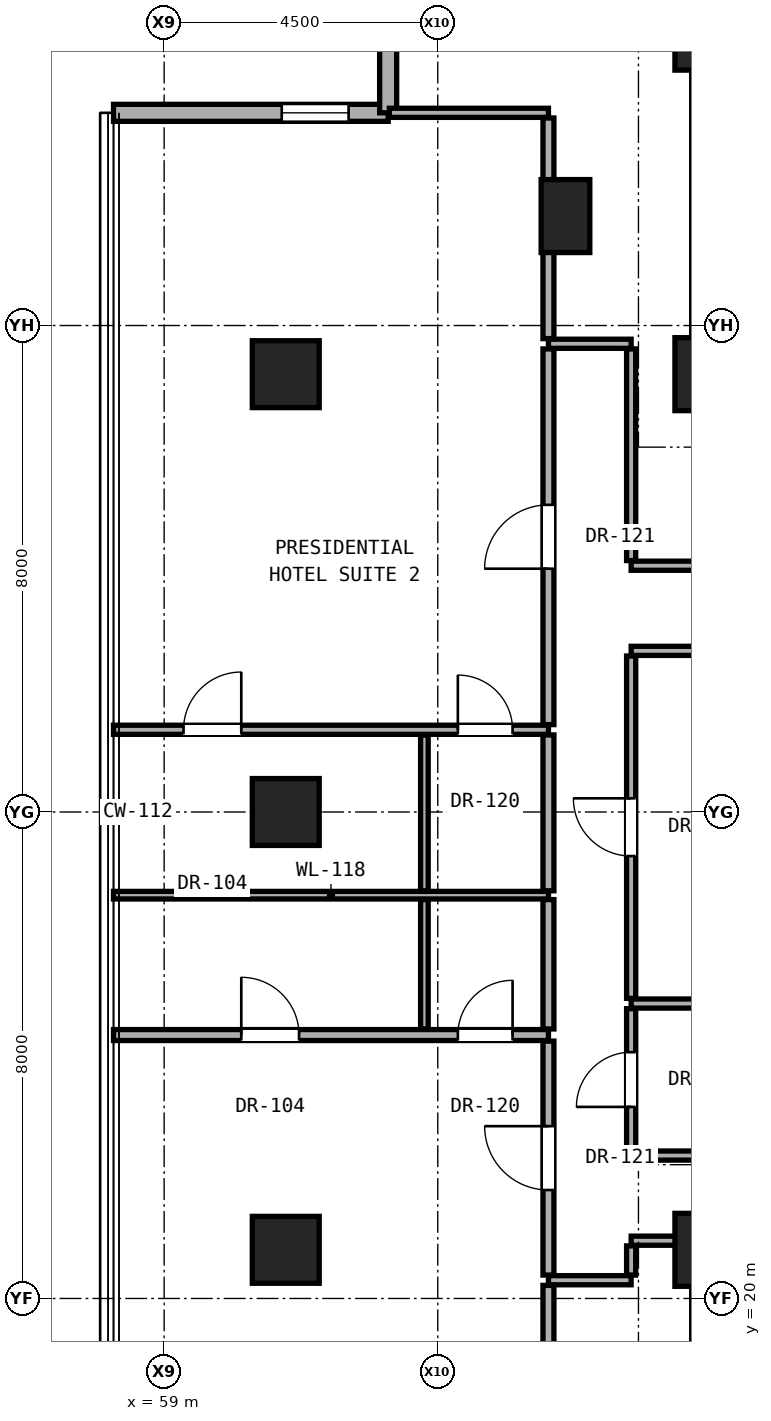
"""IFC4 building model, lengths in metres.
Left out: names, types, materials, properties, quantities, classifications, styles, units other than length and angle.
Written with IfcOpenShell. Run it as: python <this file> out.ifc"""

import sys

from ifc_helpers import new_model, si_unit, direction, frame, frame_2d, origin, origin_2d, place, context, subcontext, project, spatial, rectangle, hollow_rectangle, extrude, element, fill, save


model = new_model("IFC4")
c1 = context("Model", 3, precision=1e-05, world=origin(), true_north=direction((0.0, 1.0)))
c2 = subcontext(c1, "Body", "Model", "MODEL_VIEW")
j1 = project(units=[si_unit("LENGTHUNIT", "METRE"), si_unit("PLANEANGLEUNIT", "RADIAN")], contexts=[c1])
p1 = place(None, origin())
s1 = spatial("IfcSite", under=j1, at=p1, CompositionType="ELEMENT")
p2 = place(p1, origin())
s2 = spatial("IfcBuilding", under=s1, at=p2, CompositionType="ELEMENT")
p3 = place(p2, frame((0.0, 0.0, 104.9)))
s3 = spatial("IfcBuildingStorey", under=s2, at=p3, CompositionType="ELEMENT", Elevation=104.9)
for number, where, z_axis, x_axis in (
    (1, (68.0, 20.8, 0.0), (0.0, 0.0, 1.0), (1.0, 0.0, 0.0)),
    (2, (68.0, 35.2, 0.0), (0.0, 0.0, 1.0), (1.0, 0.0, 0.0)),
    (3, (68.0, 40.8, 0.0), (0.0, 0.0, 1.0), (1.0, 0.0, 0.0)),
):
    element("IfcColumn", number, at=place(p3, frame(where, z_axis=z_axis, x_axis=x_axis)), inside=s3, PredefinedType="COLUMN", context=c2, shape_type="SweptSolid", body=[
        extrude(rectangle(XDim=1.2, YDim=1.2, at=origin_2d()), origin(), (0.0, 0.0, 1.0), 3.3),
    ])
for number, where, z_axis, x_axis in (
    (4, (61.0, 20.8, 0.0), (0.0, 0.0, 1.0), (1.0, 0.0, 0.0)),
    (5, (61.0, 28.0, 0.0), (0.0, 0.0, 1.0), (1.0, 0.0, 0.0)),
    (6, (61.0, 35.2, 0.0), (0.0, 0.0, 1.0), (1.0, 0.0, 0.0)),
):
    element("IfcColumn", number, at=place(p3, frame(where, z_axis=z_axis, x_axis=x_axis)), inside=s3, PredefinedType="COLUMN", context=c2, shape_type="SweptSolid", body=[
        extrude(hollow_rectangle(XDim=1.1, YDim=1.1, WallThickness=0.06, at=origin_2d()), origin(), (0.0, 0.0, 1.0), 3.3),
    ])
p4 = place(p3, frame((65.6, 37.8, 0.0), z_axis=(0.0, 0.0, 1.0), x_axis=(1.0, 0.0, 0.0)))
e7 = element("IfcColumn", 7, at=p4, inside=s3, PredefinedType="PILASTER", context=c2, shape_type="SweptSolid", body=[
    extrude(rectangle(XDim=0.8, YDim=1.2, at=origin_2d()), origin(), (0.0, 0.0, 1.0), 3.3),
])
for number, where, z_axis, x_axis in (
    (8, (68.0, 35.2, 0.0), (0.0, 0.0, 1.0), (0.0, 1.0, 0.0)),
    (9, (68.0, 15.2, 0.0), (0.0, 0.0, 1.0), (0.0, 1.0, 0.0)),
):
    element("IfcWall", number, at=place(p3, frame(where, z_axis=z_axis, x_axis=x_axis)), inside=s3, PredefinedType="SHEAR", context=c2, shape_type="SweptSolid", body=[
        extrude(rectangle(XDim=5.6, YDim=0.65, at=frame_2d((2.8, 0.0))), origin(), (0.0, 0.0, 1.0), 3.08),
    ])
p5 = place(p3, frame((62.684, 39.498, 0.0), z_axis=(0.0, 0.0, 1.0), x_axis=(-1.0, 0.0, 0.0)))
e10 = element("IfcWall", 10, at=p5, inside=s3, PredefinedType="SOLIDWALL", context=c2, shape_type="SweptSolid", body=[
    extrude(rectangle(XDim=4.516, YDim=0.28, at=frame_2d((2.258, 0.0))), origin(), (0.0, 0.0, 1.0), 3.06),
])
p6 = place(p5, frame((0.65, 0.0, 0.85)))
e11 = element("IfcOpeningElement", 11, at=p6, cuts=e10, PredefinedType="OPENING", context=c2, shape_type="SweptSolid", body=[
    extrude(rectangle(XDim=1.1, YDim=2.0, at=frame_2d((0.55, 1.0))), frame((0.0, 0.15, 0.0), z_axis=(0.0, -1.0, 0.0), x_axis=(1.0, 0.0, 0.0)), (0.0, 0.0, 1.0), 0.3),
])
p7 = place(p3, frame((62.684, 44.014, 0.0), z_axis=(0.0, 0.0, 1.0), x_axis=(0.0, -1.0, 0.0)))
e12 = element("IfcWall", 12, at=p7, inside=s3, PredefinedType="SOLIDWALL", context=c2, shape_type="SweptSolid", body=[
    extrude(rectangle(XDim=4.516, YDim=0.28, at=frame_2d((2.258, 0.0))), origin(), (0.0, 0.0, 1.0), 3.06),
])
p8 = place(p3, frame((65.32, 20.3, 0.0), z_axis=(0.0, 0.0, 1.0), x_axis=(1.0, 0.0, 0.0)))
e13 = element("IfcWall", 13, at=p8, inside=s3, PredefinedType="PARTITIONING", context=c2, shape_type="SweptSolid", body=[
    extrude(rectangle(XDim=1.36, YDim=0.15, at=frame_2d((0.68, 0.0))), origin(), (0.0, 0.0, 1.0), 3.08),
])
p9 = place(p3, frame((66.68, 20.95, 0.0), z_axis=(0.0, 0.0, 1.0), x_axis=(1.0, 0.0, 0.0)))
e14 = element("IfcWall", 14, at=p9, inside=s3, PredefinedType="PARTITIONING", context=c2, shape_type="SweptSolid", body=[
    extrude(rectangle(XDim=1.0, YDim=0.15, at=frame_2d((0.5, 0.0))), origin(), (0.0, 0.0, 1.0), 2.472),
])
p10 = place(p3, frame((66.68, 22.35, 0.0), z_axis=(0.0, 0.0, 1.0), x_axis=(1.0, 0.0, 0.0)))
e15 = element("IfcWall", 15, at=p10, inside=s3, PredefinedType="PARTITIONING", context=c2, shape_type="SweptSolid", body=[
    extrude(rectangle(XDim=19.5, YDim=0.15, at=frame_2d((9.75, 0.0))), origin(), (0.0, 0.0, 1.0), 2.145),
])
p11 = place(p10, frame((8.902, 0.0, 0.0)))
e16 = element("IfcOpeningElement", 16, at=p11, cuts=e15, PredefinedType="OPENING", context=c2, shape_type="SweptSolid", body=[
    extrude(rectangle(XDim=0.85, YDim=2.01, at=frame_2d((0.425, 1.005))), frame((0.0, 0.085, 0.0), z_axis=(0.0, -1.0, 0.0), x_axis=(1.0, 0.0, 0.0)), (0.0, 0.0, 1.0), 0.17),
])
p12 = place(p10, frame((15.947, 0.0, 0.0)))
e17 = element("IfcOpeningElement", 17, at=p12, cuts=e15, PredefinedType="OPENING", context=c2, shape_type="SweptSolid", body=[
    extrude(rectangle(XDim=0.85, YDim=2.01, at=frame_2d((0.425, 1.005))), frame((0.0, 0.085, 0.0), z_axis=(0.0, -1.0, 0.0), x_axis=(1.0, 0.0, 0.0)), (0.0, 0.0, 1.0), 0.17),
])
p13 = place(p3, frame((58.167, 24.332, 0.0), z_axis=(0.0, 0.0, 1.0), x_axis=(1.0, 0.0, 0.0)))
e18 = element("IfcWall", 18, at=p13, inside=s3, PredefinedType="PARTITIONING", context=c2, shape_type="SweptSolid", body=[
    extrude(rectangle(XDim=7.153, YDim=0.18, at=frame_2d((3.577, 0.0))), origin(), (0.0, 0.0, 1.0), 2.216),
])
p14 = place(p13, frame((2.102, 0.0, 0.0)))
e19 = element("IfcOpeningElement", 19, at=p14, cuts=e18, PredefinedType="OPENING", context=c2, shape_type="SweptSolid", body=[
    extrude(rectangle(XDim=0.95, YDim=2.15, at=frame_2d((0.475, 1.075))), frame((0.0, 0.1, 0.0), z_axis=(0.0, -1.0, 0.0), x_axis=(1.0, 0.0, 0.0)), (0.0, 0.0, 1.0), 0.2),
])
p15 = place(p13, frame((5.663, 0.0, 0.0)))
e20 = element("IfcOpeningElement", 20, at=p15, cuts=e18, PredefinedType="OPENING", context=c2, shape_type="SweptSolid", body=[
    extrude(rectangle(XDim=0.9, YDim=2.1, at=frame_2d((0.45, 1.05))), frame((0.0, 0.1, 0.0), z_axis=(0.0, -1.0, 0.0), x_axis=(1.0, 0.0, 0.0)), (0.0, 0.0, 1.0), 0.2),
])
p16 = place(p3, frame((66.68, 24.85, 0.0), z_axis=(0.0, 0.0, 1.0), x_axis=(1.0, 0.0, 0.0)))
e21 = element("IfcWall", 21, at=p16, inside=s3, PredefinedType="PARTITIONING", context=c2, shape_type="SweptSolid", body=[
    extrude(rectangle(XDim=3.07, YDim=0.15, at=frame_2d((1.535, 0.0))), origin(), (0.0, 0.0, 1.0), 2.145),
])
p17 = place(p3, frame((58.167, 26.632, 0.0), z_axis=(0.0, 0.0, 1.0), x_axis=(1.0, 0.0, 0.0)))
e22 = element("IfcWall", 22, at=p17, inside=s3, PredefinedType="PARTITIONING", context=c2, shape_type="SweptSolid", body=[
    extrude(rectangle(XDim=7.153, YDim=0.125, at=frame_2d((3.577, 0.0))), origin(), (0.0, 0.0, 1.0), 2.216),
])
p18 = place(p3, frame((58.167, 29.352, 0.0), z_axis=(0.0, 0.0, 1.0), x_axis=(1.0, 0.0, 0.0)))
e23 = element("IfcWall", 23, at=p18, inside=s3, PredefinedType="PARTITIONING", context=c2, shape_type="SweptSolid", body=[
    extrude(rectangle(XDim=7.153, YDim=0.15, at=frame_2d((3.577, 0.0))), origin(), (0.0, 0.0, 1.0), 2.216),
])
p19 = place(p18, frame((1.152, 0.0, 0.0)))
e24 = element("IfcOpeningElement", 24, at=p19, cuts=e23, PredefinedType="OPENING", context=c2, shape_type="SweptSolid", body=[
    extrude(rectangle(XDim=0.95, YDim=2.15, at=frame_2d((0.475, 1.075))), frame((0.0, 0.085, 0.0), z_axis=(0.0, -1.0, 0.0), x_axis=(1.0, 0.0, 0.0)), (0.0, 0.0, 1.0), 0.17),
])
p20 = place(p18, frame((5.663, 0.0, 0.0)))
e25 = element("IfcOpeningElement", 25, at=p20, cuts=e23, PredefinedType="OPENING", context=c2, shape_type="SweptSolid", body=[
    extrude(rectangle(XDim=0.9, YDim=2.1, at=frame_2d((0.45, 1.05))), frame((0.0, 0.085, 0.0), z_axis=(0.0, -1.0, 0.0), x_axis=(1.0, 0.0, 0.0)), (0.0, 0.0, 1.0), 0.17),
])
p21 = place(p3, frame((66.68, 30.65, 0.0), z_axis=(0.0, 0.0, 1.0), x_axis=(1.0, 0.0, 0.0)))
e26 = element("IfcWall", 26, at=p21, inside=s3, PredefinedType="PARTITIONING", context=c2, shape_type="SweptSolid", body=[
    extrude(rectangle(XDim=19.5, YDim=0.15, at=frame_2d((9.75, 0.0))), origin(), (0.0, 0.0, 1.0), 2.145),
])
p22 = place(p21, frame((3.795, 0.0, 0.0)))
e27 = element("IfcOpeningElement", 27, at=p22, cuts=e26, PredefinedType="OPENING", context=c2, shape_type="SweptSolid", body=[
    extrude(rectangle(XDim=0.85, YDim=2.01, at=frame_2d((0.425, 1.005))), frame((0.0, 0.085, 0.0), z_axis=(0.0, -1.0, 0.0), x_axis=(1.0, 0.0, 0.0)), (0.0, 0.0, 1.0), 0.17),
])
p23 = place(p21, frame((8.902, 0.0, 0.0)))
e28 = element("IfcOpeningElement", 28, at=p23, cuts=e26, PredefinedType="OPENING", context=c2, shape_type="SweptSolid", body=[
    extrude(rectangle(XDim=0.85, YDim=2.01, at=frame_2d((0.425, 1.005))), frame((0.0, 0.085, 0.0), z_axis=(0.0, -1.0, 0.0), x_axis=(1.0, 0.0, 0.0)), (0.0, 0.0, 1.0), 0.17),
])
p24 = place(p21, frame((15.947, 0.0, 0.0)))
e29 = element("IfcOpeningElement", 29, at=p24, cuts=e26, PredefinedType="OPENING", context=c2, shape_type="SweptSolid", body=[
    extrude(rectangle(XDim=0.85, YDim=2.01, at=frame_2d((0.425, 1.005))), frame((0.0, 0.085, 0.0), z_axis=(0.0, -1.0, 0.0), x_axis=(1.0, 0.0, 0.0)), (0.0, 0.0, 1.0), 0.17),
])
p25 = place(p3, frame((66.68, 32.05, 0.0), z_axis=(0.0, 0.0, 1.0), x_axis=(1.0, 0.0, 0.0)))
e30 = element("IfcWall", 30, at=p25, inside=s3, PredefinedType="PARTITIONING", context=c2, shape_type="SweptSolid", body=[
    extrude(rectangle(XDim=2.12, YDim=0.15, at=frame_2d((1.06, 0.0))), origin(), (0.0, 0.0, 1.0), 2.145),
])
p26 = place(p3, frame((65.32, 35.7, 0.0), z_axis=(0.0, 0.0, 1.0), x_axis=(1.0, 0.0, 0.0)))
e31 = element("IfcWall", 31, at=p26, inside=s3, PredefinedType="PARTITIONING", context=c2, shape_type="SweptSolid", body=[
    extrude(rectangle(XDim=1.36, YDim=0.15, at=frame_2d((0.68, 0.0))), origin(), (0.0, 0.0, 1.0), 3.08),
])
p27 = place(p3, frame((62.704, 39.498, 0.0), z_axis=(0.0, 0.0, 1.0), x_axis=(1.0, 0.0, 0.0)))
e32 = element("IfcWall", 32, at=p27, inside=s3, PredefinedType="PARTITIONING", context=c2, shape_type="SweptSolid", body=[
    extrude(rectangle(XDim=2.616, YDim=0.15, at=frame_2d((1.308, 0.0))), origin(), (0.0, 0.0, 1.0), 3.08),
])
p28 = place(p3, frame((63.28, 24.432, 0.0), z_axis=(0.0, 0.0, 1.0), x_axis=(0.0, 1.0, 0.0)))
e33 = element("IfcWall", 33, at=p28, inside=s3, PredefinedType="PARTITIONING", context=c2, shape_type="SweptSolid", body=[
    extrude(rectangle(XDim=2.128, YDim=0.125, at=frame_2d((1.064, 0.0))), origin(), (0.0, 0.0, 1.0), 3.08),
])
p29 = place(p3, frame((63.28, 26.705, 0.0), z_axis=(0.0, 0.0, 1.0), x_axis=(0.0, 1.0, 0.0)))
e34 = element("IfcWall", 34, at=p29, inside=s3, PredefinedType="PARTITIONING", context=c2, shape_type="SweptSolid", body=[
    extrude(rectangle(XDim=2.562, YDim=0.125, at=frame_2d((1.281, 0.0))), origin(), (0.0, 0.0, 1.0), 2.299),
])
p30 = place(p3, frame((65.32, 16.602, 0.0), z_axis=(0.0, 0.0, 1.0), x_axis=(0.0, 1.0, 0.0)))
e35 = element("IfcWall", 35, at=p30, inside=s3, PredefinedType="PARTITIONING", context=c2, shape_type="SweptSolid", body=[
    extrude(rectangle(XDim=3.613, YDim=0.18, at=frame_2d((1.807, 0.0))), origin(), (0.0, 0.0, 1.0), 2.456),
])
p31 = place(p3, frame((65.32, 20.385, 0.0), z_axis=(0.0, 0.0, 1.0), x_axis=(0.0, 1.0, 0.0)))
e36 = element("IfcWall", 36, at=p31, inside=s3, PredefinedType="PARTITIONING", context=c2, shape_type="SweptSolid", body=[
    extrude(rectangle(XDim=3.847, YDim=0.18, at=frame_2d((1.923, 0.0))), origin(), (0.0, 0.0, 1.0), 2.472),
])
p32 = place(p31, frame((1.398, 0.0, 0.0)))
e37 = element("IfcOpeningElement", 37, at=p32, cuts=e36, PredefinedType="OPENING", context=c2, shape_type="SweptSolid", body=[
    extrude(rectangle(XDim=1.05, YDim=2.2, at=frame_2d((0.525, 1.1))), frame((0.0, 0.1, 0.0), z_axis=(0.0, -1.0, 0.0), x_axis=(1.0, 0.0, 0.0)), (0.0, 0.0, 1.0), 0.2),
])
p33 = place(p3, frame((65.32, 24.432, 0.0), z_axis=(0.0, 0.0, 1.0), x_axis=(0.0, 1.0, 0.0)))
e38 = element("IfcWall", 38, at=p33, inside=s3, PredefinedType="PARTITIONING", context=c2, shape_type="SweptSolid", body=[
    extrude(rectangle(XDim=2.128, YDim=0.18, at=frame_2d((1.064, 0.0))), origin(), (0.0, 0.0, 1.0), 3.08),
])
p34 = place(p3, frame((65.32, 26.705, 0.0), z_axis=(0.0, 0.0, 1.0), x_axis=(0.0, 1.0, 0.0)))
e39 = element("IfcWall", 39, at=p34, inside=s3, PredefinedType="PARTITIONING", context=c2, shape_type="SweptSolid", body=[
    extrude(rectangle(XDim=2.562, YDim=0.18, at=frame_2d((1.281, 0.0))), origin(), (0.0, 0.0, 1.0), 2.299),
])
p35 = place(p3, frame((65.32, 29.437, 0.0), z_axis=(0.0, 0.0, 1.0), x_axis=(0.0, 1.0, 0.0)))
e40 = element("IfcWall", 40, at=p35, inside=s3, PredefinedType="PARTITIONING", context=c2, shape_type="SweptSolid", body=[
    extrude(rectangle(XDim=6.178, YDim=0.18, at=frame_2d((3.089, 0.0))), origin(), (0.0, 0.0, 1.0), 2.472),
])
p36 = place(p35, frame((2.564, 0.0, 0.0)))
e41 = element("IfcOpeningElement", 41, at=p36, cuts=e40, PredefinedType="OPENING", context=c2, shape_type="SweptSolid", body=[
    extrude(rectangle(XDim=1.05, YDim=2.2, at=frame_2d((0.525, 1.1))), frame((0.0, 0.1, 0.0), z_axis=(0.0, -1.0, 0.0), x_axis=(1.0, 0.0, 0.0)), (0.0, 0.0, 1.0), 0.2),
])
p37 = place(p3, frame((65.32, 35.785, 0.0), z_axis=(0.0, 0.0, 1.0), x_axis=(0.0, 1.0, 0.0)))
e42 = element("IfcWall", 42, at=p37, inside=s3, PredefinedType="PARTITIONING", context=c2, shape_type="SweptSolid", body=[
    extrude(rectangle(XDim=3.628, YDim=0.18, at=frame_2d((1.814, 0.0))), origin(), (0.0, 0.0, 1.0), 2.456),
])
p38 = place(p3, frame((66.68, 20.385, 0.0), z_axis=(0.0, 0.0, 1.0), x_axis=(0.0, 1.0, 0.0)))
e43 = element("IfcWall", 43, at=p38, inside=s3, PredefinedType="PARTITIONING", context=c2, shape_type="SweptSolid", body=[
    extrude(rectangle(XDim=0.48, YDim=0.15, at=frame_2d((0.24, 0.0))), origin(), (0.0, 0.0, 1.0), 2.472),
])
p39 = place(p3, frame((66.68, 22.435, 0.0), z_axis=(0.0, 0.0, 1.0), x_axis=(0.0, 1.0, 0.0)))
e44 = element("IfcWall", 44, at=p39, inside=s3, PredefinedType="PARTITIONING", context=c2, shape_type="SweptSolid", body=[
    extrude(rectangle(XDim=2.33, YDim=0.15, at=frame_2d((1.165, 0.0))), origin(), (0.0, 0.0, 1.0), 3.08),
])
p40 = place(p39, frame((0.715, 0.0, 0.0)))
e45 = element("IfcOpeningElement", 45, at=p40, cuts=e44, PredefinedType="OPENING", context=c2, shape_type="SweptSolid", body=[
    extrude(rectangle(XDim=0.9, YDim=2.1, at=frame_2d((0.45, 1.05))), frame((0.0, 0.085, 0.0), z_axis=(0.0, -1.0, 0.0), x_axis=(1.0, 0.0, 0.0)), (0.0, 0.0, 1.0), 0.17),
])
p41 = place(p3, frame((66.68, 24.935, 0.0), z_axis=(0.0, 0.0, 1.0), x_axis=(0.0, 1.0, 0.0)))
e46 = element("IfcWall", 46, at=p41, inside=s3, PredefinedType="PARTITIONING", context=c2, shape_type="SweptSolid", body=[
    extrude(rectangle(XDim=5.63, YDim=0.15, at=frame_2d((2.815, 0.0))), origin(), (0.0, 0.0, 1.0), 2.299),
])
p42 = place(p41, frame((2.34, 0.0, 0.0)))
e47 = element("IfcOpeningElement", 47, at=p42, cuts=e46, PredefinedType="OPENING", context=c2, shape_type="SweptSolid", body=[
    extrude(rectangle(XDim=0.95, YDim=2.15, at=frame_2d((0.475, 1.075))), frame((0.0, 0.085, 0.0), z_axis=(0.0, -1.0, 0.0), x_axis=(1.0, 0.0, 0.0)), (0.0, 0.0, 1.0), 0.17),
])
p43 = place(p3, frame((66.68, 32.135, 0.0), z_axis=(0.0, 0.0, 1.0), x_axis=(0.0, 1.0, 0.0)))
e48 = element("IfcWall", 48, at=p43, inside=s3, PredefinedType="PARTITIONING", context=c2, shape_type="SweptSolid", body=[
    extrude(rectangle(XDim=3.48, YDim=0.15, at=frame_2d((1.74, 0.0))), origin(), (0.0, 0.0, 1.0), 2.472),
])
p44 = place(p6, origin())
e49 = element("IfcWindow", 49, at=p44, inside=s3, PartitioningType="SINGLE_PANEL", PredefinedType="WINDOW", context=c2, shape_type="SweptSolid", body=[
    extrude(rectangle(XDim=1.1, YDim=2.0, at=frame_2d((0.55, 1.0))), frame((0.0, 0.03, 0.0), z_axis=(0.0, -1.0, 0.0), x_axis=(1.0, 0.0, 0.0)), (0.0, 0.0, 1.0), 0.06),
])
fill(e11, e49)
p45 = place(p40, origin())
e50 = element("IfcDoor", 50, at=p45, inside=s3, OperationType="SINGLE_SWING_LEFT", PredefinedType="DOOR", context=c2, shape_type="SweptSolid", body=[
    extrude(rectangle(XDim=0.9, YDim=2.1, at=frame_2d((0.45, 1.05))), frame((0.0, 0.025, 0.0), z_axis=(0.0, -1.0, 0.0), x_axis=(1.0, 0.0, 0.0)), (0.0, 0.0, 1.0), 0.05),
])
fill(e45, e50)
p46 = place(p32, origin())
e51 = element("IfcDoor", 51, at=p46, inside=s3, OperationType="SINGLE_SWING_RIGHT", PredefinedType="DOOR", context=c2, shape_type="SweptSolid", body=[
    extrude(rectangle(XDim=1.05, YDim=2.2, at=frame_2d((0.525, 1.1))), frame((0.0, 0.025, 0.0), z_axis=(0.0, -1.0, 0.0), x_axis=(1.0, 0.0, 0.0)), (0.0, 0.0, 1.0), 0.05),
])
fill(e37, e51)
p47 = place(p14, origin())
e52 = element("IfcDoor", 52, at=p47, inside=s3, OperationType="SINGLE_SWING_LEFT", PredefinedType="DOOR", context=c2, shape_type="SweptSolid", body=[
    extrude(rectangle(XDim=0.95, YDim=2.15, at=frame_2d((0.475, 1.075))), frame((0.0, 0.025, 0.0), z_axis=(0.0, -1.0, 0.0), x_axis=(1.0, 0.0, 0.0)), (0.0, 0.0, 1.0), 0.05),
])
fill(e19, e52)
p48 = place(p15, origin())
e53 = element("IfcDoor", 53, at=p48, inside=s3, OperationType="SINGLE_SWING_RIGHT", PredefinedType="DOOR", context=c2, shape_type="SweptSolid", body=[
    extrude(rectangle(XDim=0.9, YDim=2.1, at=frame_2d((0.45, 1.05))), frame((0.0, 0.025, 0.0), z_axis=(0.0, -1.0, 0.0), x_axis=(1.0, 0.0, 0.0)), (0.0, 0.0, 1.0), 0.05),
])
fill(e20, e53)
p49 = place(p36, origin())
e54 = element("IfcDoor", 54, at=p49, inside=s3, OperationType="SINGLE_SWING_LEFT", PredefinedType="DOOR", context=c2, shape_type="SweptSolid", body=[
    extrude(rectangle(XDim=1.05, YDim=2.2, at=frame_2d((0.525, 1.1))), frame((0.0, 0.025, 0.0), z_axis=(0.0, -1.0, 0.0), x_axis=(1.0, 0.0, 0.0)), (0.0, 0.0, 1.0), 0.05),
])
fill(e41, e54)
p50 = place(p19, origin())
e55 = element("IfcDoor", 55, at=p50, inside=s3, OperationType="SINGLE_SWING_RIGHT", PredefinedType="DOOR", context=c2, shape_type="SweptSolid", body=[
    extrude(rectangle(XDim=0.95, YDim=2.15, at=frame_2d((0.475, 1.075))), frame((0.0, 0.025, 0.0), z_axis=(0.0, -1.0, 0.0), x_axis=(1.0, 0.0, 0.0)), (0.0, 0.0, 1.0), 0.05),
])
fill(e24, e55)
p51 = place(p20, origin())
e56 = element("IfcDoor", 56, at=p51, inside=s3, OperationType="SINGLE_SWING_LEFT", PredefinedType="DOOR", context=c2, shape_type="SweptSolid", body=[
    extrude(rectangle(XDim=0.9, YDim=2.1, at=frame_2d((0.45, 1.05))), frame((0.0, 0.025, 0.0), z_axis=(0.0, -1.0, 0.0), x_axis=(1.0, 0.0, 0.0)), (0.0, 0.0, 1.0), 0.05),
])
fill(e25, e56)
p52 = place(p42, origin())
e57 = element("IfcDoor", 57, at=p52, inside=s3, OperationType="SINGLE_SWING_RIGHT", PredefinedType="DOOR", context=c2, shape_type="SweptSolid", body=[
    extrude(rectangle(XDim=0.95, YDim=2.15, at=frame_2d((0.475, 1.075))), frame((0.0, 0.025, 0.0), z_axis=(0.0, -1.0, 0.0), x_axis=(1.0, 0.0, 0.0)), (0.0, 0.0, 1.0), 0.05),
])
fill(e47, e57)
save(model, sys.argv[1])
